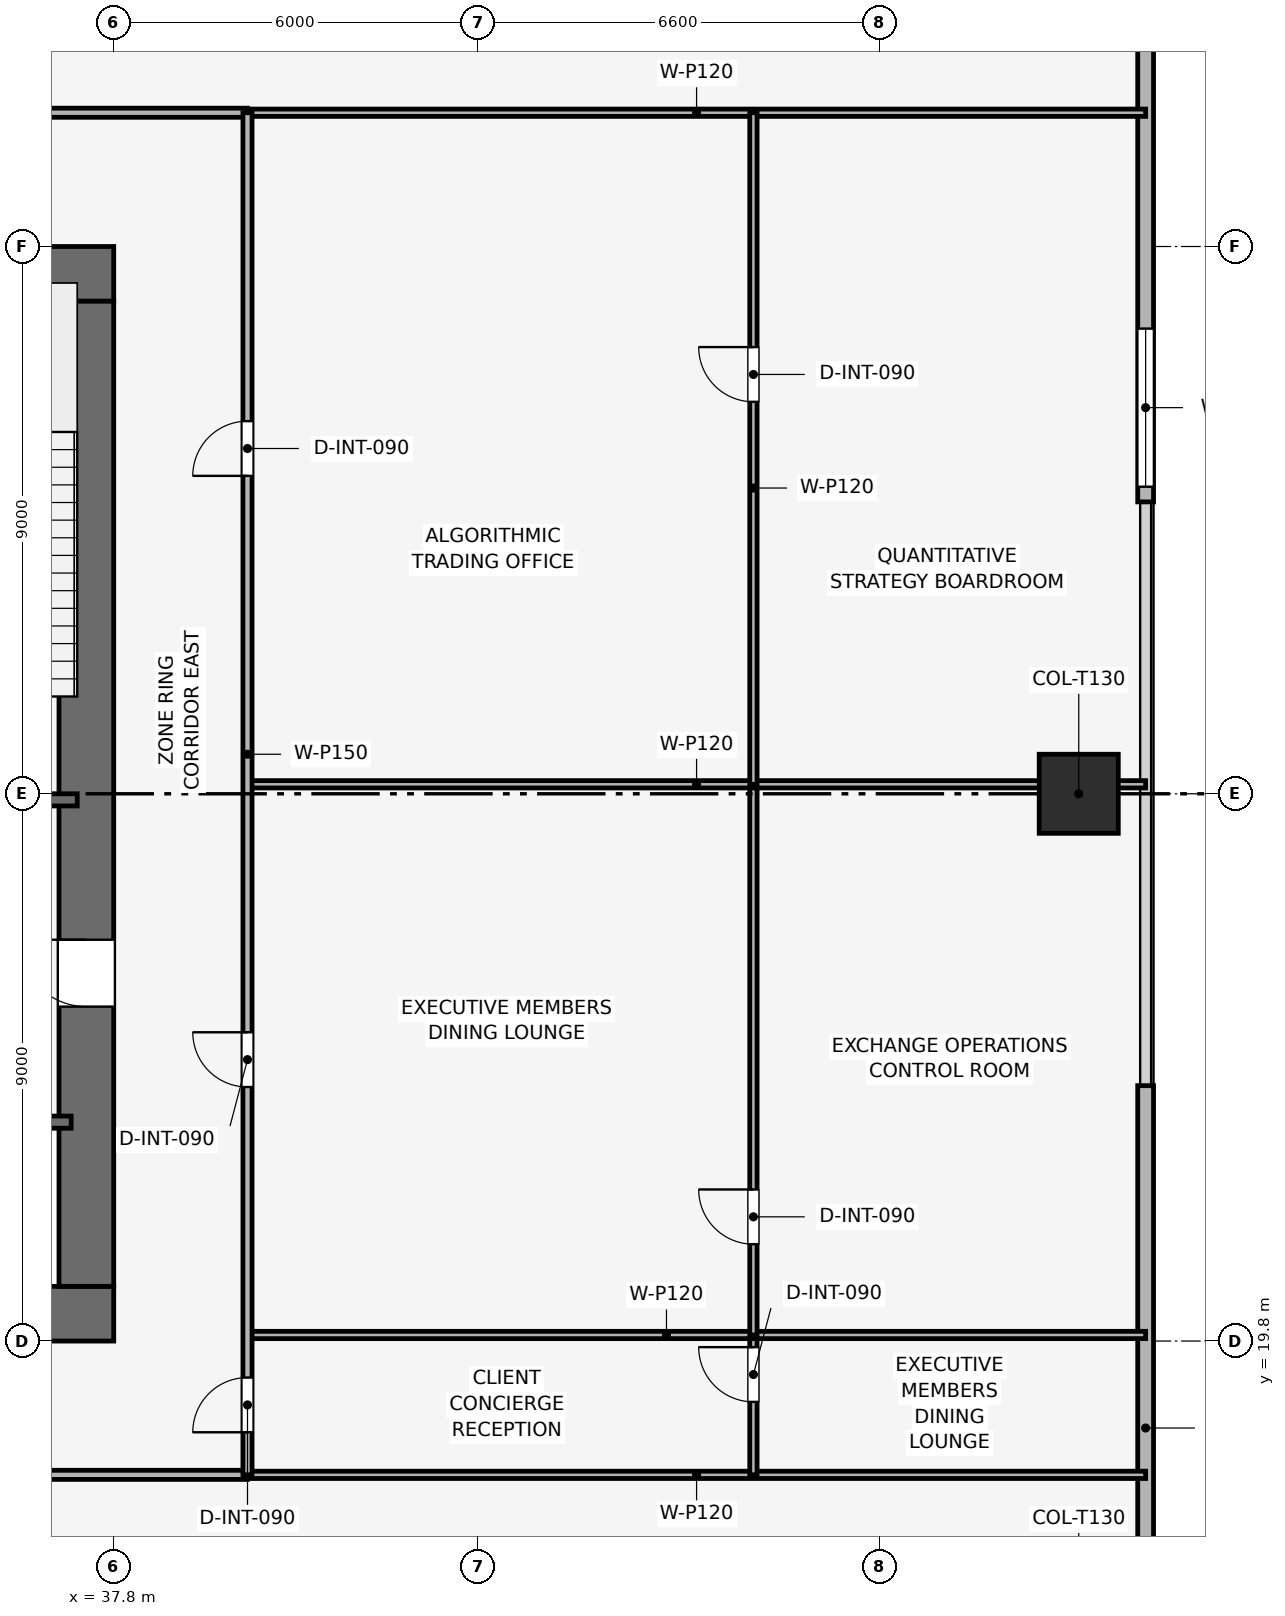
"""IFC4 building model, lengths in metres.
Left out: names, types, materials, properties, quantities, classifications, styles, units other than length and angle.
Written with IfcOpenShell. Run it as: python <this file> out.ifc"""

import sys

from ifc_helpers import new_model, si_unit, direction, frame, frame_2d, origin, origin_2d, place, context, subcontext, project, spatial, rectangle, extrude, element, fill, save


model = new_model("IFC4")
c1 = context("Model", 3, precision=1e-05, world=origin(), true_north=direction((0.0, 1.0)))
c2 = subcontext(c1, "Body", "Model", "MODEL_VIEW")
j1 = project(units=[si_unit("LENGTHUNIT", "METRE"), si_unit("PLANEANGLEUNIT", "RADIAN")], contexts=[c1])
p1 = place(None, origin())
s1 = spatial("IfcSite", under=j1, at=p1, CompositionType="ELEMENT")
p2 = place(p1, origin())
s2 = spatial("IfcBuilding", under=s1, at=p2, CompositionType="ELEMENT")
p3 = place(p2, frame((0.0, 0.0, 132.9)))
s3 = spatial("IfcBuildingStorey", under=s2, at=p3, CompositionType="ELEMENT", Elevation=132.9)
p4 = place(p3, frame((19.8, 20.25, 0.0), z_axis=(0.0, 0.0, 1.0), x_axis=(1.0, 0.0, 0.0)))
e1 = element("IfcWall", 1, at=p4, inside=s3, PredefinedType="SHEAR", context=c2, shape_type="SweptSolid", body=[
    extrude(rectangle(XDim=18.0, YDim=0.9, at=frame_2d((9.0, 0.0))), origin(), (0.0, 0.0, 1.0), 5.4),
])
p5 = place(p4, frame((8.4, 0.0, 0.0)))
e2 = element("IfcOpeningElement", 2, at=p5, cuts=e1, PredefinedType="OPENING", context=c2, shape_type="SweptSolid", body=[
    extrude(rectangle(XDim=1.2, YDim=2.2, at=frame_2d((0.6, 1.1))), frame((0.0, 0.46, 0.0), z_axis=(0.0, -1.0, 0.0), x_axis=(1.0, 0.0, 0.0)), (0.0, 0.0, 1.0), 0.92),
])
p6 = place(p3, frame((19.8, 37.35, 0.0), z_axis=(0.0, 0.0, 1.0), x_axis=(1.0, 0.0, 0.0)))
e3 = element("IfcWall", 3, at=p6, inside=s3, PredefinedType="SHEAR", context=c2, shape_type="SweptSolid", body=[
    extrude(rectangle(XDim=18.0, YDim=0.9, at=frame_2d((9.0, 0.0))), origin(), (0.0, 0.0, 1.0), 5.4),
])
p7 = place(p6, frame((7.05, 0.0, 0.0)))
e4 = element("IfcOpeningElement", 4, at=p7, cuts=e3, PredefinedType="OPENING", context=c2, shape_type="SweptSolid", body=[
    extrude(rectangle(XDim=1.1, YDim=2.15, at=frame_2d((0.55, 1.075))), frame((0.0, 0.46, 0.0), z_axis=(0.0, -1.0, 0.0), x_axis=(1.0, 0.0, 0.0)), (0.0, 0.0, 1.0), 0.92),
])
p8 = place(p3, frame((37.35, 20.7, 0.0), z_axis=(0.0, 0.0, 1.0), x_axis=(0.0, 1.0, 0.0)))
e5 = element("IfcWall", 5, at=p8, inside=s3, PredefinedType="SHEAR", context=c2, shape_type="SweptSolid", body=[
    extrude(rectangle(XDim=16.2, YDim=0.9, at=frame_2d((8.1, 0.0))), origin(), (0.0, 0.0, 1.0), 5.4),
])
p9 = place(p8, frame((4.6, 0.0, 0.0)))
e6 = element("IfcOpeningElement", 6, at=p9, cuts=e5, PredefinedType="OPENING", context=c2, shape_type="SweptSolid", body=[
    extrude(rectangle(XDim=1.1, YDim=2.15, at=frame_2d((0.55, 1.075))), frame((0.0, 0.46, 0.0), z_axis=(0.0, -1.0, 0.0), x_axis=(1.0, 0.0, 0.0)), (0.0, 0.0, 1.0), 0.92),
])
p10 = place(p3, frame((53.67, 28.8, 0.09), z_axis=(-0.316171863562, 0.0, 0.948701930372), x_axis=(0.0, -1.0, 0.0)))
e7 = element("IfcColumn", 7, at=p10, inside=s3, PredefinedType="COLUMN", context=c2, shape_type="SweptSolid", body=[
    extrude(rectangle(XDim=1.3, YDim=1.3, at=origin_2d()), origin(), (0.0, 0.0, 1.0), 5.241),
])
p11 = place(p3, frame((54.77, 47.7, 0.0), z_axis=(0.0, 0.0, 1.0), x_axis=(0.0, -1.0, 0.0)))
e8 = element("IfcWall", 8, at=p11, inside=s3, PredefinedType="SOLIDWALL", context=c2, shape_type="SweptSolid", body=[
    extrude(rectangle(XDim=14.1, YDim=0.26, at=frame_2d((7.05, 0.0))), origin(), (0.0, 0.0, 1.0), 5.145),
])
p12 = place(p11, frame((11.25, 0.0, 0.9)))
e9 = element("IfcOpeningElement", 9, at=p12, cuts=e8, PredefinedType="OPENING", context=c2, shape_type="SweptSolid", body=[
    extrude(rectangle(XDim=2.6, YDim=2.2, at=frame_2d((1.3, 1.1))), frame((0.0, 0.14, 0.0), z_axis=(0.0, -1.0, 0.0), x_axis=(1.0, 0.0, 0.0)), (0.0, 0.0, 1.0), 0.28),
])
p13 = place(p3, frame((54.77, 24.0, 0.0), z_axis=(0.0, 0.0, 1.0), x_axis=(0.0, -1.0, 0.0)))
e10 = element("IfcWall", 10, at=p13, inside=s3, PredefinedType="SOLIDWALL", context=c2, shape_type="SweptSolid", body=[
    extrude(rectangle(XDim=14.1, YDim=0.26, at=frame_2d((7.05, 0.0))), origin(), (0.0, 0.0, 1.0), 5.145),
])
p14 = place(p13, frame((11.25, 0.0, 0.9)))
e11 = element("IfcOpeningElement", 11, at=p14, cuts=e10, PredefinedType="OPENING", context=c2, shape_type="SweptSolid", body=[
    extrude(rectangle(XDim=2.6, YDim=2.2, at=frame_2d((1.3, 1.1))), frame((0.0, 0.14, 0.0), z_axis=(0.0, -1.0, 0.0), x_axis=(1.0, 0.0, 0.0)), (0.0, 0.0, 1.0), 0.28),
])
p15 = place(p3, frame((34.05, 28.7, 0.0), z_axis=(0.0, 0.0, 1.0), x_axis=(1.0, 0.0, 0.0)))
e12 = element("IfcWall", 12, at=p15, inside=s3, PredefinedType="SHEAR", context=c2, shape_type="SweptSolid", body=[
    extrude(rectangle(XDim=3.15, YDim=0.2, at=frame_2d((1.575, 0.0))), origin(), (0.0, 0.0, 1.0), 5.145),
])
p16 = place(p15, frame((0.8, 0.0, 0.0)))
e13 = element("IfcOpeningElement", 13, at=p16, cuts=e12, PredefinedType="OPENING", context=c2, shape_type="SweptSolid", body=[
    extrude(rectangle(XDim=1.0, YDim=2.1, at=frame_2d((0.5, 1.05))), frame((0.0, 0.11, 0.0), z_axis=(0.0, -1.0, 0.0), x_axis=(1.0, 0.0, 0.0)), (0.0, 0.0, 1.0), 0.22),
])
p17 = place(p3, frame((34.05, 23.4, 0.0), z_axis=(0.0, 0.0, 1.0), x_axis=(1.0, 0.0, 0.0)))
e14 = element("IfcWall", 14, at=p17, inside=s3, PredefinedType="SHEAR", context=c2, shape_type="SweptSolid", body=[
    extrude(rectangle(XDim=3.05, YDim=0.2, at=frame_2d((1.525, 0.0))), origin(), (0.0, 0.0, 1.0), 5.145),
])
p18 = place(p17, frame((1.2, 0.0, 0.0)))
e15 = element("IfcOpeningElement", 15, at=p18, cuts=e14, PredefinedType="OPENING", context=c2, shape_type="SweptSolid", body=[
    extrude(rectangle(XDim=1.1, YDim=2.15, at=frame_2d((0.55, 1.075))), frame((0.0, 0.11, 0.0), z_axis=(0.0, -1.0, 0.0), x_axis=(1.0, 0.0, 0.0)), (0.0, 0.0, 1.0), 0.22),
])
for number, where, z_axis, x_axis in (
    (16, (40.0, 17.6, 0.0), (0.0, 0.0, 1.0), (1.0, 0.0, 0.0)),
    (17, (40.0, 40.0, 0.0), (0.0, 0.0, 1.0), (1.0, 0.0, 0.0)),
):
    element("IfcWall", number, at=place(p3, frame(where, z_axis=z_axis, x_axis=x_axis)), inside=s3, PredefinedType="PARTITIONING", context=c2, shape_type="SweptSolid", body=[
        extrude(rectangle(XDim=14.77, YDim=0.12, at=frame_2d((7.385, 0.0))), origin(), (0.0, 0.0, 1.0), 4.63),
    ])
p19 = place(p3, frame((48.32, 17.6, 0.0), z_axis=(0.0, 0.0, 1.0), x_axis=(0.0, 1.0, 0.0)))
e18 = element("IfcWall", 18, at=p19, inside=s3, PredefinedType="PARTITIONING", context=c2, shape_type="SweptSolid", body=[
    extrude(rectangle(XDim=2.3, YDim=0.12, at=frame_2d((1.15, 0.0))), origin(), (0.0, 0.0, 1.0), 5.145),
])
p20 = place(p19, frame((1.2, 0.0, 0.0)))
e19 = element("IfcOpeningElement", 19, at=p20, cuts=e18, PredefinedType="OPENING", context=c2, shape_type="SweptSolid", body=[
    extrude(rectangle(XDim=0.9, YDim=2.1, at=frame_2d((0.45, 1.05))), frame((0.0, 0.07, 0.0), z_axis=(0.0, -1.0, 0.0), x_axis=(1.0, 0.0, 0.0)), (0.0, 0.0, 1.0), 0.14),
])
p21 = place(p3, frame((40.0, 19.9, 0.0), z_axis=(0.0, 0.0, 1.0), x_axis=(1.0, 0.0, 0.0)))
e20 = element("IfcWall", 20, at=p21, inside=s3, PredefinedType="PARTITIONING", context=c2, shape_type="SweptSolid", body=[
    extrude(rectangle(XDim=14.77, YDim=0.12, at=frame_2d((7.385, 0.0))), origin(), (0.0, 0.0, 1.0), 4.63),
])
p22 = place(p3, frame((48.32, 19.9, 0.0), z_axis=(0.0, 0.0, 1.0), x_axis=(0.0, 1.0, 0.0)))
e21 = element("IfcWall", 21, at=p22, inside=s3, PredefinedType="PARTITIONING", context=c2, shape_type="SweptSolid", body=[
    extrude(rectangle(XDim=9.056, YDim=0.12, at=frame_2d((4.528, 0.0))), origin(), (0.0, 0.0, 1.0), 4.68),
])
p23 = place(p22, frame((1.493, 0.0, 0.0)))
e22 = element("IfcOpeningElement", 22, at=p23, cuts=e21, PredefinedType="OPENING", context=c2, shape_type="SweptSolid", body=[
    extrude(rectangle(XDim=0.9, YDim=2.1, at=frame_2d((0.45, 1.05))), frame((0.0, 0.07, 0.0), z_axis=(0.0, -1.0, 0.0), x_axis=(1.0, 0.0, 0.0)), (0.0, 0.0, 1.0), 0.14),
])
p24 = place(p3, frame((40.0, 28.956, 0.0), z_axis=(0.0, 0.0, 1.0), x_axis=(1.0, 0.0, 0.0)))
e23 = element("IfcWall", 23, at=p24, inside=s3, PredefinedType="PARTITIONING", context=c2, shape_type="SweptSolid", body=[
    extrude(rectangle(XDim=14.77, YDim=0.12, at=frame_2d((7.385, 0.0))), origin(), (0.0, 0.0, 1.0), 4.63),
])
p25 = place(p3, frame((48.32, 28.956, 0.0), z_axis=(0.0, 0.0, 1.0), x_axis=(0.0, 1.0, 0.0)))
e24 = element("IfcWall", 24, at=p25, inside=s3, PredefinedType="PARTITIONING", context=c2, shape_type="SweptSolid", body=[
    extrude(rectangle(XDim=11.044, YDim=0.12, at=frame_2d((5.522, 0.0))), origin(), (0.0, 0.0, 1.0), 4.68),
])
p26 = place(p25, frame((6.29, 0.0, 0.0)))
e25 = element("IfcOpeningElement", 25, at=p26, cuts=e24, PredefinedType="OPENING", context=c2, shape_type="SweptSolid", body=[
    extrude(rectangle(XDim=0.9, YDim=2.1, at=frame_2d((0.45, 1.05))), frame((0.0, 0.07, 0.0), z_axis=(0.0, -1.0, 0.0), x_axis=(1.0, 0.0, 0.0)), (0.0, 0.0, 1.0), 0.14),
])
p27 = place(p3, frame((17.6, 17.6, 0.0), z_axis=(0.0, 0.0, 1.0), x_axis=(1.0, 0.0, 0.0)))
e26 = element("IfcWall", 26, at=p27, inside=s3, PredefinedType="PARTITIONING", context=c2, shape_type="SweptSolid", body=[
    extrude(rectangle(XDim=22.4, YDim=0.15, at=frame_2d((11.2, 0.0))), origin(), (0.0, 0.0, 1.0), 4.68),
])
p28 = place(p27, frame((0.804, 0.0, 0.0)))
e27 = element("IfcOpeningElement", 27, at=p28, cuts=e26, PredefinedType="OPENING", context=c2, shape_type="SweptSolid", body=[
    extrude(rectangle(XDim=0.9, YDim=2.1, at=frame_2d((0.45, 1.05))), frame((0.0, 0.085, 0.0), z_axis=(0.0, -1.0, 0.0), x_axis=(1.0, 0.0, 0.0)), (0.0, 0.0, 1.0), 0.17),
])
p29 = place(p27, frame((6.424, 0.0, 0.0)))
e28 = element("IfcOpeningElement", 28, at=p29, cuts=e26, PredefinedType="OPENING", context=c2, shape_type="SweptSolid", body=[
    extrude(rectangle(XDim=0.9, YDim=2.1, at=frame_2d((0.45, 1.05))), frame((0.0, 0.085, 0.0), z_axis=(0.0, -1.0, 0.0), x_axis=(1.0, 0.0, 0.0)), (0.0, 0.0, 1.0), 0.17),
])
p30 = place(p27, frame((16.369, 0.0, 0.0)))
e29 = element("IfcOpeningElement", 29, at=p30, cuts=e26, PredefinedType="OPENING", context=c2, shape_type="SweptSolid", body=[
    extrude(rectangle(XDim=0.9, YDim=2.1, at=frame_2d((0.45, 1.05))), frame((0.0, 0.085, 0.0), z_axis=(0.0, -1.0, 0.0), x_axis=(1.0, 0.0, 0.0)), (0.0, 0.0, 1.0), 0.17),
])
p31 = place(p3, frame((17.6, 40.0, 0.0), z_axis=(0.0, 0.0, 1.0), x_axis=(1.0, 0.0, 0.0)))
e30 = element("IfcWall", 30, at=p31, inside=s3, PredefinedType="PARTITIONING", context=c2, shape_type="SweptSolid", body=[
    extrude(rectangle(XDim=22.4, YDim=0.15, at=frame_2d((11.2, 0.0))), origin(), (0.0, 0.0, 1.0), 4.68),
])
p32 = place(p31, frame((10.75, 0.0, 0.0)))
e31 = element("IfcOpeningElement", 31, at=p32, cuts=e30, PredefinedType="OPENING", context=c2, shape_type="SweptSolid", body=[
    extrude(rectangle(XDim=0.9, YDim=2.1, at=frame_2d((0.45, 1.05))), frame((0.0, 0.085, 0.0), z_axis=(0.0, -1.0, 0.0), x_axis=(1.0, 0.0, 0.0)), (0.0, 0.0, 1.0), 0.17),
])
p33 = place(p3, frame((40.0, 17.6, 0.0), z_axis=(0.0, 0.0, 1.0), x_axis=(0.0, 1.0, 0.0)))
e32 = element("IfcWall", 32, at=p33, inside=s3, PredefinedType="PARTITIONING", context=c2, shape_type="SweptSolid", body=[
    extrude(rectangle(XDim=22.4, YDim=0.15, at=frame_2d((11.2, 0.0))), origin(), (0.0, 0.0, 1.0), 4.68),
])
p34 = place(p33, frame((0.7, 0.0, 0.0)))
e33 = element("IfcOpeningElement", 33, at=p34, cuts=e32, PredefinedType="OPENING", context=c2, shape_type="SweptSolid", body=[
    extrude(rectangle(XDim=0.9, YDim=2.1, at=frame_2d((0.45, 1.05))), frame((0.0, 0.085, 0.0), z_axis=(0.0, -1.0, 0.0), x_axis=(1.0, 0.0, 0.0)), (0.0, 0.0, 1.0), 0.17),
])
p35 = place(p33, frame((6.378, 0.0, 0.0)))
e34 = element("IfcOpeningElement", 34, at=p35, cuts=e32, PredefinedType="OPENING", context=c2, shape_type="SweptSolid", body=[
    extrude(rectangle(XDim=0.9, YDim=2.1, at=frame_2d((0.45, 1.05))), frame((0.0, 0.085, 0.0), z_axis=(0.0, -1.0, 0.0), x_axis=(1.0, 0.0, 0.0)), (0.0, 0.0, 1.0), 0.17),
])
p36 = place(p33, frame((16.428, 0.0, 0.0)))
e35 = element("IfcOpeningElement", 35, at=p36, cuts=e32, PredefinedType="OPENING", context=c2, shape_type="SweptSolid", body=[
    extrude(rectangle(XDim=0.9, YDim=2.1, at=frame_2d((0.45, 1.05))), frame((0.0, 0.085, 0.0), z_axis=(0.0, -1.0, 0.0), x_axis=(1.0, 0.0, 0.0)), (0.0, 0.0, 1.0), 0.17),
])
p37 = place(p12, origin())
e36 = element("IfcWindow", 36, at=p37, inside=s3, PartitioningType="SINGLE_PANEL", PredefinedType="WINDOW", context=c2, shape_type="SweptSolid", body=[
    extrude(rectangle(XDim=2.6, YDim=2.2, at=frame_2d((1.3, 1.1))), frame((0.0, 0.03, 0.0), z_axis=(0.0, -1.0, 0.0), x_axis=(1.0, 0.0, 0.0)), (0.0, 0.0, 1.0), 0.06),
])
fill(e9, e36)
p38 = place(p20, origin())
e37 = element("IfcDoor", 37, at=p38, inside=s3, OperationType="SINGLE_SWING_RIGHT", PredefinedType="DOOR", context=c2, shape_type="SweptSolid", body=[
    extrude(rectangle(XDim=0.9, YDim=2.1, at=frame_2d((0.45, 1.05))), frame((0.0, 0.025, 0.0), z_axis=(0.0, -1.0, 0.0), x_axis=(1.0, 0.0, 0.0)), (0.0, 0.0, 1.0), 0.05),
])
fill(e19, e37)
p39 = place(p23, origin())
e38 = element("IfcDoor", 38, at=p39, inside=s3, OperationType="SINGLE_SWING_RIGHT", PredefinedType="DOOR", context=c2, shape_type="SweptSolid", body=[
    extrude(rectangle(XDim=0.9, YDim=2.1, at=frame_2d((0.45, 1.05))), frame((0.0, 0.025, 0.0), z_axis=(0.0, -1.0, 0.0), x_axis=(1.0, 0.0, 0.0)), (0.0, 0.0, 1.0), 0.05),
])
fill(e22, e38)
p40 = place(p26, origin())
e39 = element("IfcDoor", 39, at=p40, inside=s3, OperationType="SINGLE_SWING_RIGHT", PredefinedType="DOOR", context=c2, shape_type="SweptSolid", body=[
    extrude(rectangle(XDim=0.9, YDim=2.1, at=frame_2d((0.45, 1.05))), frame((0.0, 0.025, 0.0), z_axis=(0.0, -1.0, 0.0), x_axis=(1.0, 0.0, 0.0)), (0.0, 0.0, 1.0), 0.05),
])
fill(e25, e39)
p41 = place(p34, origin())
e40 = element("IfcDoor", 40, at=p41, inside=s3, OperationType="SINGLE_SWING_LEFT", PredefinedType="DOOR", context=c2, shape_type="SweptSolid", body=[
    extrude(rectangle(XDim=0.9, YDim=2.1, at=frame_2d((0.45, 1.05))), frame((0.0, 0.025, 0.0), z_axis=(0.0, -1.0, 0.0), x_axis=(1.0, 0.0, 0.0)), (0.0, 0.0, 1.0), 0.05),
])
fill(e33, e40)
p42 = place(p35, origin())
e41 = element("IfcDoor", 41, at=p42, inside=s3, OperationType="SINGLE_SWING_RIGHT", PredefinedType="DOOR", context=c2, shape_type="SweptSolid", body=[
    extrude(rectangle(XDim=0.9, YDim=2.1, at=frame_2d((0.45, 1.05))), frame((0.0, 0.025, 0.0), z_axis=(0.0, -1.0, 0.0), x_axis=(1.0, 0.0, 0.0)), (0.0, 0.0, 1.0), 0.05),
])
fill(e34, e41)
p43 = place(p36, origin())
e42 = element("IfcDoor", 42, at=p43, inside=s3, OperationType="SINGLE_SWING_LEFT", PredefinedType="DOOR", context=c2, shape_type="SweptSolid", body=[
    extrude(rectangle(XDim=0.9, YDim=2.1, at=frame_2d((0.45, 1.05))), frame((0.0, 0.025, 0.0), z_axis=(0.0, -1.0, 0.0), x_axis=(1.0, 0.0, 0.0)), (0.0, 0.0, 1.0), 0.05),
])
fill(e35, e42)
p44 = place(p9, origin())
e43 = element("IfcDoor", 43, at=p44, inside=s3, OperationType="SINGLE_SWING_RIGHT", PredefinedType="DOOR", context=c2, shape_type="SweptSolid", body=[
    extrude(rectangle(XDim=1.1, YDim=2.15, at=frame_2d((0.55, 1.075))), frame((0.0, 0.025, 0.0), z_axis=(0.0, -1.0, 0.0), x_axis=(1.0, 0.0, 0.0)), (0.0, 0.0, 1.0), 0.05),
])
fill(e6, e43)
save(model, sys.argv[1])
